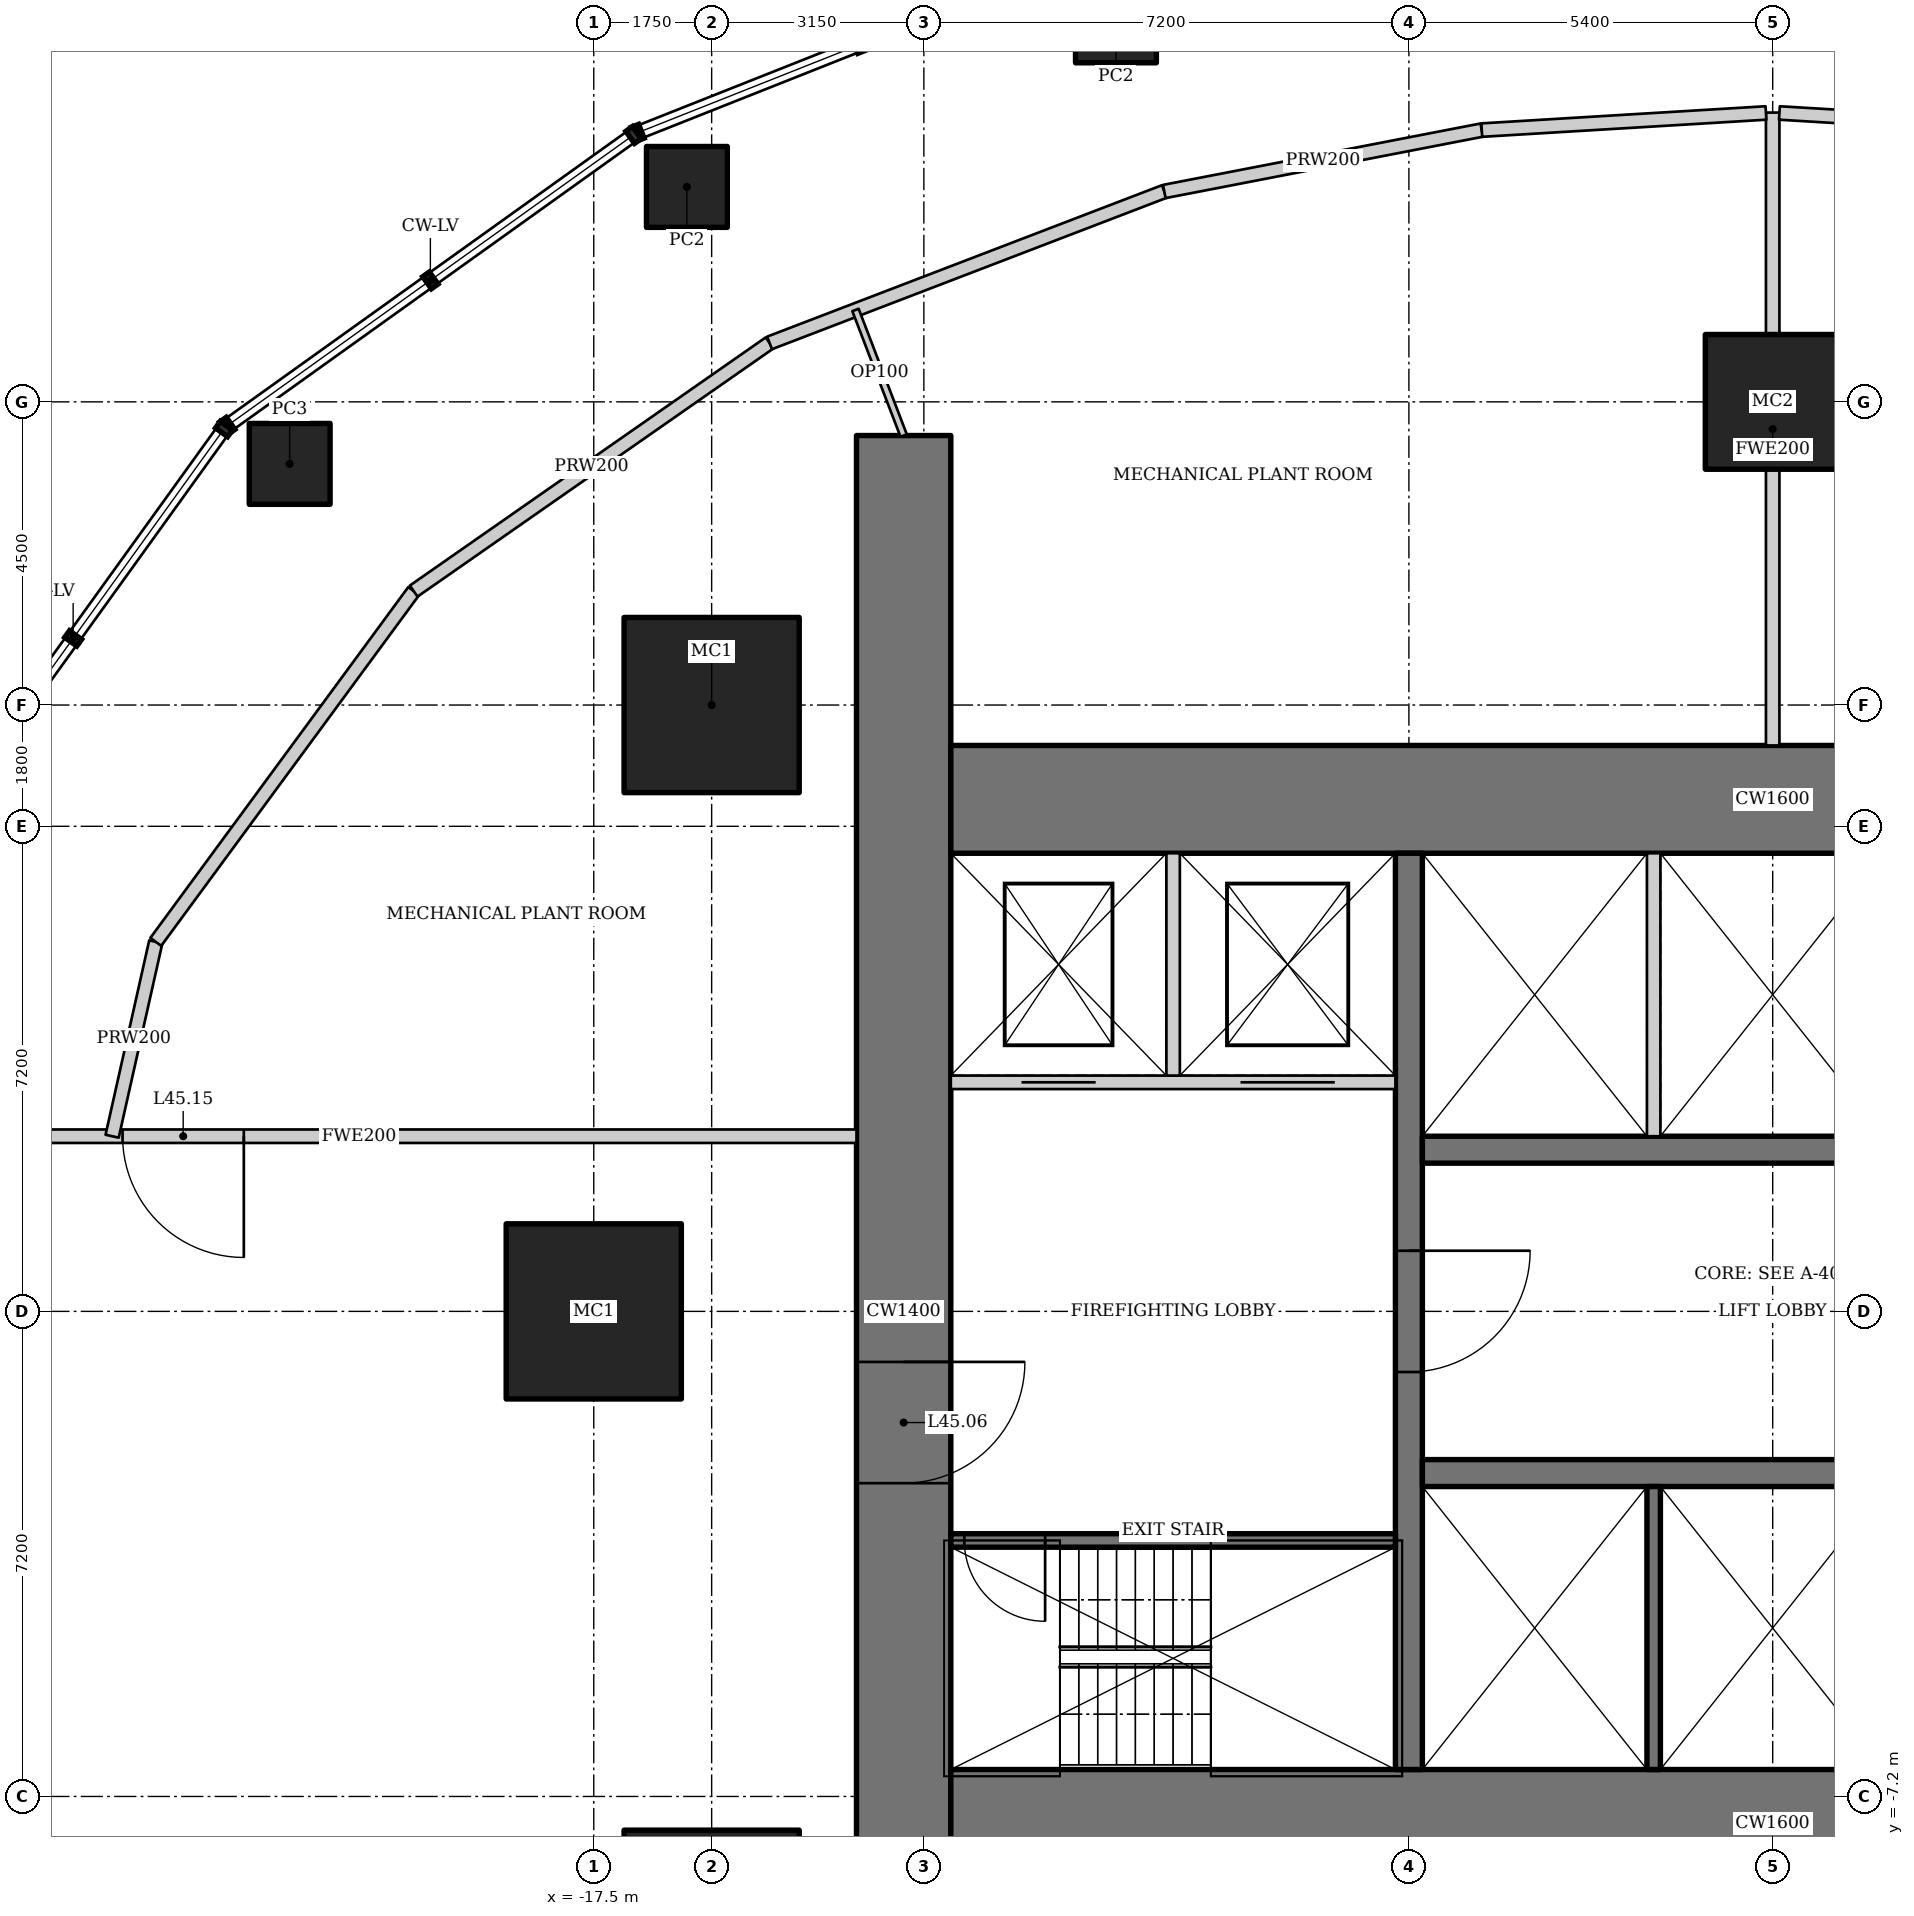
"""IFC4 building model, lengths in metres.
Left out: names, types, materials, properties, quantities, classifications, styles, units other than length and angle.
Written with IfcOpenShell. Run it as: python <this file> out.ifc"""

import sys

from ifc_helpers import new_model, si_unit, direction, frame, frame_2d, origin, origin_2d, place, context, subcontext, project, spatial, rectangle, hollow_rectangle, extrude, element, fill, save


model = new_model("IFC4")
c1 = context("Model", 3, precision=1e-05, world=origin(), true_north=direction((0.0, 1.0)))
c2 = subcontext(c1, "Body", "Model", "MODEL_VIEW")
j1 = project(units=[si_unit("LENGTHUNIT", "METRE"), si_unit("PLANEANGLEUNIT", "RADIAN")], contexts=[c1])
p1 = place(None, origin())
s1 = spatial("IfcSite", under=j1, at=p1, CompositionType="ELEMENT")
p2 = place(p1, origin())
s2 = spatial("IfcBuilding", under=s1, at=p2, CompositionType="ELEMENT")
p3 = place(p2, frame((0.0, 0.0, 193.0)))
s3 = spatial("IfcBuildingStorey", under=s2, at=p3, CompositionType="ELEMENT", Elevation=193.0)
p4 = place(p3, frame((0.0, 13.5, 0.0), z_axis=(0.0, 0.0, 1.0), x_axis=(1.0, 0.0, 0.0)))
e1 = element("IfcColumn", 1, at=p4, inside=s3, PredefinedType="COLUMN", context=c2, shape_type="SweptSolid", body=[
    extrude(hollow_rectangle(XDim=2.0, YDim=2.0, WallThickness=0.17, at=origin_2d()), origin(), (0.0, 0.0, 1.0), 6.0),
])
for number, where, z_axis, x_axis in (
    (2, (-15.75, 9.0, 0.0), (0.0, 0.0, 1.0), (1.0, 0.0, 0.0)),
    (3, (-17.5, 0.0, 0.0), (0.0, 0.0, 1.0), (1.0, 0.0, 0.0)),
    (4, (-15.75, -9.0, 0.0), (0.0, 0.0, 1.0), (1.0, 0.0, 0.0)),
):
    element("IfcColumn", number, at=place(p3, frame(where, z_axis=z_axis, x_axis=x_axis)), inside=s3, PredefinedType="COLUMN", context=c2, shape_type="SweptSolid", body=[
        extrude(hollow_rectangle(XDim=2.6, YDim=2.6, WallThickness=0.13, at=origin_2d()), origin(), (0.0, 0.0, 1.0), 6.0),
    ])
p5 = place(p3, frame((0.0, 20.4, 0.0), z_axis=(0.0, -0.242535625036, 0.970142500145), x_axis=(1.0, 0.0, 0.0)))
e5 = element("IfcColumn", 5, at=p5, inside=s3, PredefinedType="COLUMN", context=c2, shape_type="SweptSolid", body=[
    extrude(hollow_rectangle(XDim=1.4, YDim=1.4, WallThickness=0.1, at=origin_2d()), origin(), (0.0, 0.0, 1.0), 6.007),
])
p6 = place(p3, frame((-4.645, 20.12, 0.0), z_axis=(0.055108290298, -0.23884305259, 0.969493203983), x_axis=(0.974399541185, 0.224823339843, 0.0)))
e6 = element("IfcColumn", 6, at=p6, inside=s3, PredefinedType="COLUMN", context=c2, shape_type="SweptSolid", body=[
    extrude(hollow_rectangle(XDim=1.2, YDim=1.2, WallThickness=0.1, at=origin_2d()), origin(), (0.0, 0.0, 1.0), 6.034),
])
p7 = place(p3, frame((-9.749, 19.133, 0.0), z_axis=(0.115072645182, -0.225902794668, 0.967329423564), x_axis=(0.891055307505, 0.45389474437, 0.0)))
e7 = element("IfcColumn", 7, at=p7, inside=s3, PredefinedType="COLUMN", context=c2, shape_type="SweptSolid", body=[
    extrude(hollow_rectangle(XDim=1.2, YDim=1.2, WallThickness=0.1, at=origin_2d()), origin(), (0.0, 0.0, 1.0), 6.042),
])
p8 = place(p3, frame((-16.118, 16.69, 0.0), z_axis=(0.18822591258, -0.194872023339, 0.962598514623), x_axis=(0.719265676815, 0.69473511942, 0.0)))
e8 = element("IfcColumn", 8, at=p8, inside=s3, PredefinedType="COLUMN", context=c2, shape_type="SweptSolid", body=[
    extrude(hollow_rectangle(XDim=1.2, YDim=1.2, WallThickness=0.1, at=origin_2d()), origin(), (0.0, 0.0, 1.0), 6.061),
])
p9 = place(p3, frame((-22.014, 12.579, 0.0), z_axis=(0.253597337108, -0.144907034473, 0.956394448945), x_axis=(0.496124150365, 0.868251592238, 0.0)))
e9 = element("IfcColumn", 9, at=p9, inside=s3, PredefinedType="COLUMN", context=c2, shape_type="SweptSolid", body=[
    extrude(hollow_rectangle(XDim=1.2, YDim=1.2, WallThickness=0.12, at=origin_2d()), origin(), (0.0, 0.0, 1.0), 6.087),
])
p10 = place(p3, frame((-26.42, 6.587, 0.0), z_axis=(0.300740657131, -0.074975456692, 0.950754299513), x_axis=(0.24189877761, 0.970301489946, 0.0)))
e10 = element("IfcColumn", 10, at=p10, inside=s3, PredefinedType="COLUMN", context=c2, shape_type="SweptSolid", body=[
    extrude(hollow_rectangle(XDim=1.2, YDim=1.2, WallThickness=0.1, at=origin_2d()), origin(), (0.0, 0.0, 1.0), 6.112),
])
p11 = place(p3, frame((-27.9, 0.0, 0.0), z_axis=(0.316203704758, 0.0, 0.948691318131), x_axis=(0.0, 1.0, 0.0)))
e11 = element("IfcColumn", 11, at=p11, inside=s3, PredefinedType="COLUMN", context=c2, shape_type="SweptSolid", body=[
    extrude(hollow_rectangle(XDim=1.4, YDim=1.4, WallThickness=0.1, at=origin_2d()), origin(), (0.0, 0.0, 1.0), 6.088),
])
p12 = place(p3, frame((-26.42, -6.587, 0.0), z_axis=(0.300740657131, 0.074975456692, 0.950754299513), x_axis=(-0.24189877761, 0.970301489946, 0.0)))
e12 = element("IfcColumn", 12, at=p12, inside=s3, PredefinedType="COLUMN", context=c2, shape_type="SweptSolid", body=[
    extrude(hollow_rectangle(XDim=1.2, YDim=1.2, WallThickness=0.1, at=origin_2d()), origin(), (0.0, 0.0, 1.0), 6.112),
])
p13 = place(p3, frame((-12.9, 13.0, 0.0), z_axis=(0.0, 0.0, 1.0), x_axis=(0.0, -1.0, 0.0)))
e13 = element("IfcWall", 13, at=p13, inside=s3, PredefinedType="SHEAR", context=c2, shape_type="SweptSolid", body=[
    extrude(rectangle(XDim=26.0, YDim=1.4, at=frame_2d((13.0, 0.0))), origin(), (0.0, 0.0, 1.0), 6.0),
])
p14 = place(p13, frame((13.75, 0.0, 0.0)))
e14 = element("IfcOpeningElement", 14, at=p14, cuts=e13, PredefinedType="OPENING", context=c2, shape_type="SweptSolid", body=[
    extrude(rectangle(XDim=1.8, YDim=2.1, at=frame_2d((0.9, 1.05))), frame((0.0, 0.71, 0.0), z_axis=(0.0, -1.0, 0.0), x_axis=(1.0, 0.0, 0.0)), (0.0, 0.0, 1.0), 1.42),
])
for number, where, z_axis, x_axis in (
    (15, (-12.2, -7.6, 0.0), (0.0, 0.0, 1.0), (1.0, 0.0, 0.0)),
    (16, (12.2, 7.6, 0.0), (0.0, 0.0, 1.0), (-1.0, 0.0, 0.0)),
):
    element("IfcWall", number, at=place(p3, frame(where, z_axis=z_axis, x_axis=x_axis)), inside=s3, PredefinedType="SHEAR", context=c2, shape_type="SweptSolid", body=[
        extrude(rectangle(XDim=24.4, YDim=1.6, at=frame_2d((12.2, 0.0))), origin(), (0.0, 0.0, 1.0), 6.0),
    ])
p15 = place(p3, frame((-5.4, 6.8, 0.0), z_axis=(0.0, 0.0, 1.0), x_axis=(0.0, -1.0, 0.0)))
e17 = element("IfcWall", 17, at=p15, inside=s3, PredefinedType="SHEAR", context=c2, shape_type="SweptSolid", body=[
    extrude(rectangle(XDim=13.6, YDim=0.4, at=frame_2d((6.8, 0.0))), origin(), (0.0, 0.0, 1.0), 6.0),
])
p16 = place(p15, frame((5.9, 0.0, 0.0)))
e18 = element("IfcOpeningElement", 18, at=p16, cuts=e17, PredefinedType="OPENING", context=c2, shape_type="SweptSolid", body=[
    extrude(rectangle(XDim=1.8, YDim=2.1, at=frame_2d((0.9, 1.05))), frame((0.0, 0.21, 0.0), z_axis=(0.0, -1.0, 0.0), x_axis=(1.0, 0.0, 0.0)), (0.0, 0.0, 1.0), 0.42),
])
p17 = place(p3, frame((-5.2, -2.4, 0.0), z_axis=(0.0, 0.0, 1.0), x_axis=(1.0, 0.0, 0.0)))
e19 = element("IfcWall", 19, at=p17, inside=s3, PredefinedType="SHEAR", context=c2, shape_type="SweptSolid", body=[
    extrude(rectangle(XDim=10.4, YDim=0.4, at=frame_2d((5.2, 0.0))), origin(), (0.0, 0.0, 1.0), 6.0),
])
p18 = place(p3, frame((-1.767, -2.6, 0.0), z_axis=(0.0, 0.0, 1.0), x_axis=(0.0, -1.0, 0.0)))
e20 = element("IfcWall", 20, at=p18, inside=s3, PredefinedType="SOLIDWALL", context=c2, shape_type="SweptSolid", body=[
    extrude(rectangle(XDim=4.2, YDim=0.2, at=frame_2d((2.1, 0.0))), origin(), (0.0, 0.0, 1.0), 6.0),
])
p19 = place(p3, frame((5.2, 2.4, 0.0), z_axis=(0.0, 0.0, 1.0), x_axis=(-1.0, 0.0, 0.0)))
e21 = element("IfcWall", 21, at=p19, inside=s3, PredefinedType="SHEAR", context=c2, shape_type="SweptSolid", body=[
    extrude(rectangle(XDim=10.4, YDim=0.4, at=frame_2d((5.2, 0.0))), origin(), (0.0, 0.0, 1.0), 6.0),
])
p20 = place(p3, frame((-1.767, 2.6, 0.0), z_axis=(0.0, 0.0, 1.0), x_axis=(0.0, 1.0, 0.0)))
e22 = element("IfcWall", 22, at=p20, inside=s3, PredefinedType="SOLIDWALL", context=c2, shape_type="SweptSolid", body=[
    extrude(rectangle(XDim=4.2, YDim=0.2, at=frame_2d((2.1, 0.0))), origin(), (0.0, 0.0, 1.0), 6.0),
])
p21 = place(p3, frame((-5.6, -3.4, 0.0), z_axis=(0.0, 0.0, 1.0), x_axis=(-1.0, 0.0, 0.0)))
e23 = element("IfcWall", 23, at=p21, inside=s3, PredefinedType="SHEAR", context=c2, shape_type="SweptSolid", body=[
    extrude(rectangle(XDim=6.6, YDim=0.2, at=frame_2d((3.3, 0.0))), origin(), (0.0, 0.0, 1.0), 6.0),
])
p22 = place(p21, frame((5.2, 0.0, 0.0)))
e24 = element("IfcOpeningElement", 24, at=p22, cuts=e23, PredefinedType="OPENING", context=c2, shape_type="SweptSolid", body=[
    extrude(rectangle(XDim=1.2, YDim=2.1, at=frame_2d((0.6, 1.05))), frame((0.0, 0.11, 0.0), z_axis=(0.0, -1.0, 0.0), x_axis=(1.0, 0.0, 0.0)), (0.0, 0.0, 1.0), 0.22),
])
p23 = place(p3, frame((-12.2, 3.4, 0.0), z_axis=(0.0, 0.0, 1.0), x_axis=(1.0, 0.0, 0.0)))
e25 = element("IfcWall", 25, at=p23, inside=s3, PredefinedType="SOLIDWALL", context=c2, shape_type="SweptSolid", body=[
    extrude(rectangle(XDim=6.6, YDim=0.2, at=frame_2d((3.3, 0.0))), origin(), (0.0, 0.0, 1.0), 6.0),
])
p24 = place(p23, frame((1.05, 0.0, 0.0)))
e26 = element("IfcOpeningElement", 26, at=p24, cuts=e25, PredefinedType="OPENING", context=c2, shape_type="SweptSolid", body=[
    extrude(rectangle(XDim=1.1, YDim=2.2, at=frame_2d((0.55, 1.1))), frame((0.0, 0.11, 0.0), z_axis=(0.0, -1.0, 0.0), x_axis=(1.0, 0.0, 0.0)), (0.0, 0.0, 1.0), 0.22),
])
p25 = place(p23, frame((4.3, 0.0, 0.0)))
e27 = element("IfcOpeningElement", 27, at=p25, cuts=e25, PredefinedType="OPENING", context=c2, shape_type="SweptSolid", body=[
    extrude(rectangle(XDim=1.4, YDim=2.2, at=frame_2d((0.7, 1.1))), frame((0.0, 0.11, 0.0), z_axis=(0.0, -1.0, 0.0), x_axis=(1.0, 0.0, 0.0)), (0.0, 0.0, 1.0), 0.22),
])
p26 = place(p3, frame((-8.9, 3.5, 0.0), z_axis=(0.0, 0.0, 1.0), x_axis=(0.0, 1.0, 0.0)))
e28 = element("IfcWall", 28, at=p26, inside=s3, PredefinedType="SOLIDWALL", context=c2, shape_type="SweptSolid", body=[
    extrude(rectangle(XDim=3.3, YDim=0.2, at=frame_2d((1.65, 0.0))), origin(), (0.0, 0.0, 1.0), 6.0),
])
p27 = place(p3, frame((-13.6, 2.6, 0.0), z_axis=(0.0, 0.0, 1.0), x_axis=(-1.0, 0.0, 0.0)))
e29 = element("IfcWall", 29, at=p27, inside=s3, PredefinedType="SOLIDWALL", context=c2, shape_type="SweptSolid", body=[
    extrude(rectangle(XDim=14.77, YDim=0.2, at=frame_2d((7.385, 0.0))), origin(), (0.0, 0.0, 1.0), 5.85),
])
p28 = place(p27, frame((9.095, 0.0, 0.0)))
e30 = element("IfcOpeningElement", 30, at=p28, cuts=e29, PredefinedType="OPENING", context=c2, shape_type="SweptSolid", body=[
    extrude(rectangle(XDim=1.8, YDim=2.1, at=frame_2d((0.9, 1.05))), frame((0.0, 0.11, 0.0), z_axis=(0.0, -1.0, 0.0), x_axis=(1.0, 0.0, 0.0)), (0.0, 0.0, 1.0), 0.22),
])
p29 = place(p3, frame((0.0, 8.4, 0.0), z_axis=(0.0, 0.0, 1.0), x_axis=(0.0, 1.0, 0.0)))
e31 = element("IfcWall", 31, at=p29, inside=s3, PredefinedType="SOLIDWALL", context=c2, shape_type="SweptSolid", body=[
    extrude(rectangle(XDim=9.394, YDim=0.2, at=frame_2d((4.697, 0.0))), origin(), (0.0, 0.0, 1.0), 4.65),
])
p30 = place(p3, frame((-24.65, 2.6, 0.0), z_axis=(0.0, 0.0, 1.0), x_axis=(0.219211589051, 0.975677343811, 0.0)))
e32 = element("IfcWall", 32, at=p30, inside=s3, PredefinedType="SOLIDWALL", context=c2, shape_type="SweptSolid", body=[
    extrude(rectangle(XDim=2.957, YDim=0.2, at=frame_2d((1.479, 0.0))), origin(), (0.0, 0.0, 1.0), 5.85),
])
p31 = place(p3, frame((-24.001, 5.485, 0.0), z_axis=(0.0, 0.0, 1.0), x_axis=(0.592429396569, 0.805622374367, 0.0)))
e33 = element("IfcWall", 33, at=p31, inside=s3, PredefinedType="SOLIDWALL", context=c2, shape_type="SweptSolid", body=[
    extrude(rectangle(XDim=6.462, YDim=0.2, at=frame_2d((3.231, 0.0))), origin(), (0.0, 0.0, 1.0), 5.85),
])
p32 = place(p3, frame((-20.173, 10.691, 0.0), z_axis=(0.0, 0.0, 1.0), x_axis=(0.820274205327, 0.571970478324, 0.0)))
e34 = element("IfcWall", 34, at=p32, inside=s3, PredefinedType="SOLIDWALL", context=c2, shape_type="SweptSolid", body=[
    extrude(rectangle(XDim=6.44, YDim=0.2, at=frame_2d((3.22, 0.0))), origin(), (0.0, 0.0, 1.0), 5.85),
])
p33 = place(p3, frame((-14.89, 14.375, 0.0), z_axis=(0.0, 0.0, 1.0), x_axis=(0.933673071728, 0.358126507159, 0.0)))
e35 = element("IfcWall", 35, at=p33, inside=s3, PredefinedType="SOLIDWALL", context=c2, shape_type="SweptSolid", body=[
    extrude(rectangle(XDim=6.276, YDim=0.2, at=frame_2d((3.138, 0.0))), origin(), (0.0, 0.0, 1.0), 5.85),
])
p34 = place(p3, frame((-9.031, 16.622, 0.0), z_axis=(0.0, 0.0, 1.0), x_axis=(0.981807084442, 0.189881144245, 0.0)))
e36 = element("IfcWall", 36, at=p34, inside=s3, PredefinedType="SOLIDWALL", context=c2, shape_type="SweptSolid", body=[
    extrude(rectangle(XDim=4.8, YDim=0.2, at=frame_2d((2.4, 0.0))), origin(), (0.0, 0.0, 1.0), 5.85),
])
for number, where, z_axis, x_axis in (
    (37, (-4.318, 17.534, 0.0), (0.0, 0.0, 1.0), (0.998, 0.06, 0.0)),
    (38, (0.1, 17.788, 0.0), (0.0, 0.0, 1.0), (0.998, -0.06, 0.0)),
):
    element("IfcWall", number, at=place(p3, frame(where, z_axis=z_axis, x_axis=x_axis)), inside=s3, PredefinedType="SOLIDWALL", context=c2, shape_type="SweptSolid", body=[
        extrude(rectangle(XDim=4.226, YDim=0.2, at=frame_2d((2.113, 0.0))), origin(), (0.0, 0.0, 1.0), 5.85),
    ])
p35 = place(p3, frame((-12.9, 13.0, 0.0), z_axis=(0.0, 0.0, 1.0), x_axis=(-0.358175892566, 0.9336541276, 0.0)))
e39 = element("IfcWall", 39, at=p35, inside=s3, PredefinedType="PARTITIONING", context=c2, shape_type="SweptSolid", body=[
    extrude(rectangle(XDim=1.997, YDim=0.1, at=frame_2d((0.998, 0.0))), origin(), (0.0, 0.0, 1.0), 5.85),
])
p36 = place(p16, origin())
e40 = element("IfcDoor", 40, at=p36, inside=s3, OperationType="DOUBLE_DOOR_DOUBLE_SWING", PredefinedType="DOOR", context=c2, shape_type="SweptSolid", body=[
    extrude(rectangle(XDim=1.8, YDim=2.1, at=frame_2d((0.9, 1.05))), frame((0.0, 0.025, 0.0), z_axis=(0.0, -1.0, 0.0), x_axis=(1.0, 0.0, 0.0)), (0.0, 0.0, 1.0), 0.05),
])
fill(e18, e40)
p37 = place(p22, origin())
e41 = element("IfcDoor", 41, at=p37, inside=s3, OperationType="SINGLE_SWING_RIGHT", PredefinedType="DOOR", context=c2, shape_type="SweptSolid", body=[
    extrude(rectangle(XDim=1.2, YDim=2.1, at=frame_2d((0.6, 1.05))), frame((0.0, 0.025, 0.0), z_axis=(0.0, -1.0, 0.0), x_axis=(1.0, 0.0, 0.0)), (0.0, 0.0, 1.0), 0.05),
])
fill(e24, e41)
p38 = place(p14, origin())
e42 = element("IfcDoor", 42, at=p38, inside=s3, OperationType="DOUBLE_DOOR_DOUBLE_SWING", PredefinedType="DOOR", context=c2, shape_type="SweptSolid", body=[
    extrude(rectangle(XDim=1.8, YDim=2.1, at=frame_2d((0.9, 1.05))), frame((0.0, 0.025, 0.0), z_axis=(0.0, -1.0, 0.0), x_axis=(1.0, 0.0, 0.0)), (0.0, 0.0, 1.0), 0.05),
])
fill(e14, e42)
p39 = place(p24, origin())
e43 = element("IfcDoor", 43, at=p39, inside=s3, OperationType="DOUBLE_DOOR_SLIDING", PredefinedType="DOOR", context=c2, shape_type="SweptSolid", body=[
    extrude(rectangle(XDim=1.1, YDim=2.2, at=frame_2d((0.55, 1.1))), frame((0.0, 0.025, 0.0), z_axis=(0.0, -1.0, 0.0), x_axis=(1.0, 0.0, 0.0)), (0.0, 0.0, 1.0), 0.05),
])
fill(e26, e43)
p40 = place(p25, origin())
e44 = element("IfcDoor", 44, at=p40, inside=s3, OperationType="DOUBLE_DOOR_SLIDING", PredefinedType="DOOR", context=c2, shape_type="SweptSolid", body=[
    extrude(rectangle(XDim=1.4, YDim=2.2, at=frame_2d((0.7, 1.1))), frame((0.0, 0.025, 0.0), z_axis=(0.0, -1.0, 0.0), x_axis=(1.0, 0.0, 0.0)), (0.0, 0.0, 1.0), 0.05),
])
fill(e27, e44)
p41 = place(p28, origin())
e45 = element("IfcDoor", 45, at=p41, inside=s3, OperationType="DOUBLE_DOOR_DOUBLE_SWING", PredefinedType="DOOR", context=c2, shape_type="SweptSolid", body=[
    extrude(rectangle(XDim=1.8, YDim=2.1, at=frame_2d((0.9, 1.05))), frame((0.0, 0.025, 0.0), z_axis=(0.0, -1.0, 0.0), x_axis=(1.0, 0.0, 0.0)), (0.0, 0.0, 1.0), 0.05),
])
fill(e30, e45)
save(model, sys.argv[1])
